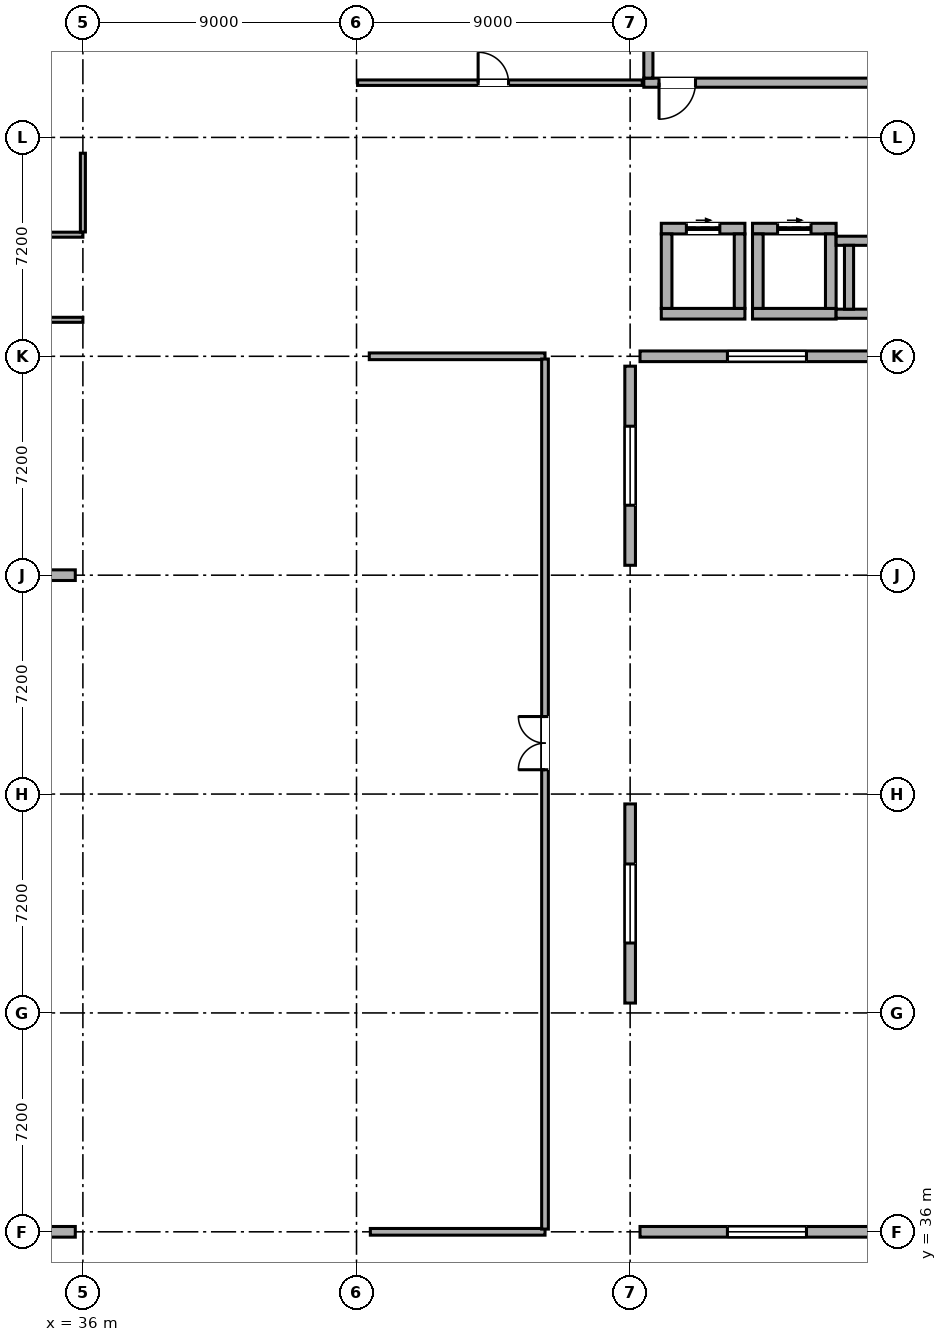
"""IFC4 building model, lengths in metres.
Left out: names, types, materials, properties, quantities, classifications, styles, units other than length and angle.
Written with IfcOpenShell. Run it as: python <this file> out.ifc"""

import sys

from ifc_helpers import new_model, si_unit, direction, frame, frame_2d, origin, origin_2d, place, context, subcontext, project, spatial, rectangle, hollow_rectangle, extrude, element, fill, save


model = new_model("IFC4")
c1 = context("Model", 3, precision=1e-05, world=origin(), true_north=direction((0.0, 1.0)))
c2 = subcontext(c1, "Body", "Model", "MODEL_VIEW")
j1 = project(units=[si_unit("LENGTHUNIT", "METRE"), si_unit("PLANEANGLEUNIT", "RADIAN")], contexts=[c1])
p1 = place(None, origin())
s1 = spatial("IfcSite", under=j1, at=p1, CompositionType="ELEMENT")
p2 = place(p1, origin())
s2 = spatial("IfcBuilding", under=s1, at=p2, CompositionType="ELEMENT")
p3 = place(p2, origin())
s3 = spatial("IfcBuildingStorey", under=s2, at=p3, CompositionType="ELEMENT", Elevation=0.0)
for number, where, z_axis, x_axis in (
    (1, (36.0, 36.0, 0.0), (0.0, 0.0, 1.0), (1.0, 0.0, 0.0)),
    (2, (36.0, 57.6, 0.0), (0.0, 0.0, 1.0), (1.0, 0.0, 0.0)),
    (3, (36.0, 64.8, 0.0), (0.0, 0.0, 1.0), (1.0, 0.0, 0.0)),
    (4, (36.0, 72.0, 0.0), (0.0, 0.0, 1.0), (1.0, 0.0, 0.0)),
    (5, (45.0, 36.0, 0.0), (0.0, 0.0, 1.0), (1.0, 0.0, 0.0)),
    (6, (45.0, 43.2, 0.0), (0.0, 0.0, 1.0), (1.0, 0.0, 0.0)),
    (7, (45.0, 50.4, 0.0), (0.0, 0.0, 1.0), (1.0, 0.0, 0.0)),
    (8, (45.0, 57.6, 0.0), (0.0, 0.0, 1.0), (1.0, 0.0, 0.0)),
    (9, (45.0, 64.8, 0.0), (0.0, 0.0, 1.0), (1.0, 0.0, 0.0)),
    (10, (45.0, 72.0, 0.0), (0.0, 0.0, 1.0), (1.0, 0.0, 0.0)),
):
    element("IfcColumn", number, at=place(p3, frame(where, z_axis=z_axis, x_axis=x_axis)), inside=s3, PredefinedType="COLUMN", context=c2, shape_type="SweptSolid", body=[
        extrude(hollow_rectangle(XDim=0.5, YDim=0.5, WallThickness=0.022, at=origin_2d()), origin(), (0.0, 0.0, 1.0), 4.8),
    ])
for number, where, z_axis, x_axis in (
    (11, (54.0, 36.0, 0.0), (0.0, 0.0, 1.0), (1.0, 0.0, 0.0)),
    (12, (54.0, 43.2, 0.0), (0.0, 0.0, 1.0), (1.0, 0.0, 0.0)),
    (13, (54.0, 50.4, 0.0), (0.0, 0.0, 1.0), (1.0, 0.0, 0.0)),
    (14, (54.0, 57.6, 0.0), (0.0, 0.0, 1.0), (1.0, 0.0, 0.0)),
    (15, (54.0, 64.8, 0.0), (0.0, 0.0, 1.0), (1.0, 0.0, 0.0)),
    (16, (54.0, 72.0, 0.0), (0.0, 0.0, 1.0), (1.0, 0.0, 0.0)),
):
    element("IfcColumn", number, at=place(p3, frame(where, z_axis=z_axis, x_axis=x_axis)), inside=s3, PredefinedType="COLUMN", context=c2, shape_type="SweptSolid", body=[
        extrude(hollow_rectangle(XDim=0.65, YDim=0.65, WallThickness=0.025, at=origin_2d()), origin(), (0.0, 0.0, 1.0), 4.8),
    ])
p4 = place(p3, frame((35.75, 36.0, 0.0), z_axis=(0.0, 0.0, 1.0), x_axis=(-1.0, 0.0, 0.0)))
e17 = element("IfcWall", 17, at=p4, inside=s3, PredefinedType="STANDARD", context=c2, shape_type="SweptSolid", body=[
    extrude(rectangle(XDim=8.425, YDim=0.35, at=frame_2d((4.212, 0.0))), origin(), (0.0, 0.0, 1.0), 4.055),
])
p5 = place(p4, frame((2.913, 0.0, 0.85)))
e18 = element("IfcOpeningElement", 18, at=p5, cuts=e17, PredefinedType="OPENING", context=c2, shape_type="SweptSolid", body=[
    extrude(rectangle(XDim=2.6, YDim=1.6, at=frame_2d((1.3, 0.8))), frame((0.0, 0.187, 0.0), z_axis=(0.0, -1.0, 0.0), x_axis=(1.0, 0.0, 0.0)), (0.0, 0.0, 1.0), 0.374),
])
p6 = place(p3, frame((62.675, 36.0, 0.0), z_axis=(0.0, 0.0, 1.0), x_axis=(-1.0, 0.0, 0.0)))
e19 = element("IfcWall", 19, at=p6, inside=s3, PredefinedType="STANDARD", context=c2, shape_type="SweptSolid", body=[
    extrude(rectangle(XDim=8.35, YDim=0.35, at=frame_2d((4.175, 0.0))), origin(), (0.0, 0.0, 1.0), 4.055),
])
p7 = place(p6, frame((2.875, 0.0, 0.85)))
e20 = element("IfcOpeningElement", 20, at=p7, cuts=e19, PredefinedType="OPENING", context=c2, shape_type="SweptSolid", body=[
    extrude(rectangle(XDim=2.6, YDim=1.6, at=frame_2d((1.3, 0.8))), frame((0.0, 0.187, 0.0), z_axis=(0.0, -1.0, 0.0), x_axis=(1.0, 0.0, 0.0)), (0.0, 0.0, 1.0), 0.374),
])
p8 = place(p3, frame((27.325, 57.6, 0.0), z_axis=(0.0, 0.0, 1.0), x_axis=(1.0, 0.0, 0.0)))
e21 = element("IfcWall", 21, at=p8, inside=s3, PredefinedType="STANDARD", context=c2, shape_type="SweptSolid", body=[
    extrude(rectangle(XDim=8.425, YDim=0.35, at=frame_2d((4.212, 0.0))), origin(), (0.0, 0.0, 1.0), 4.055),
])
p9 = place(p8, frame((3.012, 0.0, 0.0)))
e22 = element("IfcOpeningElement", 22, at=p9, cuts=e21, PredefinedType="OPENING", context=c2, shape_type="SweptSolid", body=[
    extrude(rectangle(XDim=2.4, YDim=2.55, at=frame_2d((1.2, 1.275))), frame((0.0, 0.187, 0.0), z_axis=(0.0, -1.0, 0.0), x_axis=(1.0, 0.0, 0.0)), (0.0, 0.0, 1.0), 0.374),
])
p10 = place(p3, frame((54.325, 64.8, 0.0), z_axis=(0.0, 0.0, 1.0), x_axis=(1.0, 0.0, 0.0)))
e23 = element("IfcWall", 23, at=p10, inside=s3, PredefinedType="STANDARD", context=c2, shape_type="SweptSolid", body=[
    extrude(rectangle(XDim=8.35, YDim=0.35, at=frame_2d((4.175, 0.0))), origin(), (0.0, 0.0, 1.0), 4.055),
])
p11 = place(p10, frame((2.875, 0.0, 0.85)))
e24 = element("IfcOpeningElement", 24, at=p11, cuts=e23, PredefinedType="OPENING", context=c2, shape_type="SweptSolid", body=[
    extrude(rectangle(XDim=2.6, YDim=1.6, at=frame_2d((1.3, 0.8))), frame((0.0, 0.187, 0.0), z_axis=(0.0, -1.0, 0.0), x_axis=(1.0, 0.0, 0.0)), (0.0, 0.0, 1.0), 0.374),
])
p12 = place(p3, frame((54.0, 50.075, 0.0), z_axis=(0.0, 0.0, 1.0), x_axis=(0.0, -1.0, 0.0)))
e25 = element("IfcWall", 25, at=p12, inside=s3, PredefinedType="STANDARD", context=c2, shape_type="SweptSolid", body=[
    extrude(rectangle(XDim=6.55, YDim=0.35, at=frame_2d((3.275, 0.0))), origin(), (0.0, 0.0, 1.0), 4.055),
])
p13 = place(p12, frame((1.975, 0.0, 0.85)))
e26 = element("IfcOpeningElement", 26, at=p13, cuts=e25, PredefinedType="OPENING", context=c2, shape_type="SweptSolid", body=[
    extrude(rectangle(XDim=2.6, YDim=1.6, at=frame_2d((1.3, 0.8))), frame((0.0, 0.187, 0.0), z_axis=(0.0, -1.0, 0.0), x_axis=(1.0, 0.0, 0.0)), (0.0, 0.0, 1.0), 0.374),
])
p14 = place(p3, frame((54.0, 64.475, 0.0), z_axis=(0.0, 0.0, 1.0), x_axis=(0.0, -1.0, 0.0)))
e27 = element("IfcWall", 27, at=p14, inside=s3, PredefinedType="STANDARD", context=c2, shape_type="SweptSolid", body=[
    extrude(rectangle(XDim=6.55, YDim=0.35, at=frame_2d((3.275, 0.0))), origin(), (0.0, 0.0, 1.0), 4.055),
])
p15 = place(p14, frame((1.975, 0.0, 0.85)))
e28 = element("IfcOpeningElement", 28, at=p15, cuts=e27, PredefinedType="OPENING", context=c2, shape_type="SweptSolid", body=[
    extrude(rectangle(XDim=2.6, YDim=1.6, at=frame_2d((1.3, 0.8))), frame((0.0, 0.187, 0.0), z_axis=(0.0, -1.0, 0.0), x_axis=(1.0, 0.0, 0.0)), (0.0, 0.0, 1.0), 0.374),
])
p16 = place(p3, frame((54.45, 73.8, 0.0), z_axis=(0.0, 0.0, 1.0), x_axis=(1.0, 0.0, 0.0)))
e29 = element("IfcWall", 29, at=p16, inside=s3, PredefinedType="SHEAR", context=c2, shape_type="SweptSolid", body=[
    extrude(rectangle(XDim=8.1, YDim=0.3, at=frame_2d((4.05, 0.0))), origin(), (0.0, 0.0, 1.0), 4.555),
])
p17 = place(p16, frame((0.5, 0.0, 0.0)))
e30 = element("IfcOpeningElement", 30, at=p17, cuts=e29, PredefinedType="OPENING", context=c2, shape_type="SweptSolid", body=[
    extrude(rectangle(XDim=1.2, YDim=2.1, at=frame_2d((0.6, 1.05))), frame((0.0, 0.162, 0.0), z_axis=(0.0, -1.0, 0.0), x_axis=(1.0, 0.0, 0.0)), (0.0, 0.0, 1.0), 0.324),
])
p18 = place(p3, frame((54.6, 73.95, 0.0), z_axis=(0.0, 0.0, 1.0), x_axis=(0.0, 1.0, 0.0)))
e31 = element("IfcWall", 31, at=p18, inside=s3, PredefinedType="SHEAR", context=c2, shape_type="SweptSolid", body=[
    extrude(rectangle(XDim=3.8, YDim=0.3, at=frame_2d((1.9, 0.0))), origin(), (0.0, 0.0, 1.0), 4.555),
])
p19 = place(p3, frame((55.025, 66.2, 0.0), z_axis=(0.0, 0.0, 1.0), x_axis=(1.0, 0.0, 0.0)))
e32 = element("IfcWall", 32, at=p19, inside=s3, PredefinedType="SHEAR", context=c2, shape_type="SweptSolid", body=[
    extrude(rectangle(XDim=2.75, YDim=0.35, at=frame_2d((1.375, 0.0))), origin(), (0.0, 0.0, 1.0), 4.555),
])
p20 = place(p3, frame((55.025, 69.0, 0.0), z_axis=(0.0, 0.0, 1.0), x_axis=(1.0, 0.0, 0.0)))
e33 = element("IfcWall", 33, at=p20, inside=s3, PredefinedType="SHEAR", context=c2, shape_type="SweptSolid", body=[
    extrude(rectangle(XDim=2.75, YDim=0.35, at=frame_2d((1.375, 0.0))), origin(), (0.0, 0.0, 1.0), 4.555),
])
p21 = place(p20, frame((0.825, 0.0, 0.0)))
e34 = element("IfcOpeningElement", 34, at=p21, cuts=e33, PredefinedType="OPENING", context=c2, shape_type="SweptSolid", body=[
    extrude(rectangle(XDim=1.1, YDim=2.1, at=frame_2d((0.55, 1.05))), frame((0.0, 0.187, 0.0), z_axis=(0.0, -1.0, 0.0), x_axis=(1.0, 0.0, 0.0)), (0.0, 0.0, 1.0), 0.374),
])
for number, where, z_axis, x_axis in (
    (35, (55.2, 66.375, 0.0), (0.0, 0.0, 1.0), (0.0, 1.0, 0.0)),
    (36, (57.6, 66.375, 0.0), (0.0, 0.0, 1.0), (0.0, 1.0, 0.0)),
):
    element("IfcWall", number, at=place(p3, frame(where, z_axis=z_axis, x_axis=x_axis)), inside=s3, PredefinedType="SHEAR", context=c2, shape_type="SweptSolid", body=[
        extrude(rectangle(XDim=2.45, YDim=0.35, at=frame_2d((1.225, 0.0))), origin(), (0.0, 0.0, 1.0), 4.555),
    ])
p22 = place(p3, frame((58.025, 66.2, 0.0), z_axis=(0.0, 0.0, 1.0), x_axis=(1.0, 0.0, 0.0)))
e37 = element("IfcWall", 37, at=p22, inside=s3, PredefinedType="SHEAR", context=c2, shape_type="SweptSolid", body=[
    extrude(rectangle(XDim=2.75, YDim=0.35, at=frame_2d((1.375, 0.0))), origin(), (0.0, 0.0, 1.0), 4.555),
])
p23 = place(p3, frame((58.025, 69.0, 0.0), z_axis=(0.0, 0.0, 1.0), x_axis=(1.0, 0.0, 0.0)))
e38 = element("IfcWall", 38, at=p23, inside=s3, PredefinedType="SHEAR", context=c2, shape_type="SweptSolid", body=[
    extrude(rectangle(XDim=2.75, YDim=0.35, at=frame_2d((1.375, 0.0))), origin(), (0.0, 0.0, 1.0), 4.555),
])
p24 = place(p23, frame((0.825, 0.0, 0.0)))
e39 = element("IfcOpeningElement", 39, at=p24, cuts=e38, PredefinedType="OPENING", context=c2, shape_type="SweptSolid", body=[
    extrude(rectangle(XDim=1.1, YDim=2.1, at=frame_2d((0.55, 1.05))), frame((0.0, 0.187, 0.0), z_axis=(0.0, -1.0, 0.0), x_axis=(1.0, 0.0, 0.0)), (0.0, 0.0, 1.0), 0.374),
])
for number, where, z_axis, x_axis in (
    (40, (58.2, 66.375, 0.0), (0.0, 0.0, 1.0), (0.0, 1.0, 0.0)),
    (41, (60.6, 66.375, 0.0), (0.0, 0.0, 1.0), (0.0, 1.0, 0.0)),
):
    element("IfcWall", number, at=place(p3, frame(where, z_axis=z_axis, x_axis=x_axis)), inside=s3, PredefinedType="SHEAR", context=c2, shape_type="SweptSolid", body=[
        extrude(rectangle(XDim=2.45, YDim=0.35, at=frame_2d((1.225, 0.0))), origin(), (0.0, 0.0, 1.0), 4.555),
    ])
for number, where, z_axis, x_axis in (
    (42, (60.775, 66.2, 0.0), (0.0, 0.0, 1.0), (1.0, 0.0, 0.0)),
    (43, (60.775, 68.6, 0.0), (0.0, 0.0, 1.0), (1.0, 0.0, 0.0)),
):
    element("IfcWall", number, at=place(p3, frame(where, z_axis=z_axis, x_axis=x_axis)), inside=s3, PredefinedType="SHEAR", context=c2, shape_type="SweptSolid", body=[
        extrude(rectangle(XDim=2.175, YDim=0.3, at=frame_2d((1.087, 0.0))), origin(), (0.0, 0.0, 1.0), 4.555),
    ])
p25 = place(p3, frame((61.2, 66.35, 0.0), z_axis=(0.0, 0.0, 1.0), x_axis=(0.0, 1.0, 0.0)))
e44 = element("IfcWall", 44, at=p25, inside=s3, PredefinedType="SHEAR", context=c2, shape_type="SweptSolid", body=[
    extrude(rectangle(XDim=2.1, YDim=0.3, at=frame_2d((1.05, 0.0))), origin(), (0.0, 0.0, 1.0), 4.555),
])
p26 = place(p3, frame((19.2, 66.0, 0.0), z_axis=(0.0, 0.0, 1.0), x_axis=(1.0, 0.0, 0.0)))
e45 = element("IfcWall", 45, at=p26, inside=s3, PredefinedType="PARTITIONING", context=c2, shape_type="SweptSolid", body=[
    extrude(rectangle(XDim=16.8, YDim=0.165, at=frame_2d((8.4, 0.0))), origin(), (0.0, 0.0, 1.0), 4.555),
])
p27 = place(p26, frame((2.575, 0.0, 0.0)))
e46 = element("IfcOpeningElement", 46, at=p27, cuts=e45, PredefinedType="OPENING", context=c2, shape_type="SweptSolid", body=[
    extrude(rectangle(XDim=1.45, YDim=2.1, at=frame_2d((0.725, 1.05))), frame((0.0, 0.094, 0.0), z_axis=(0.0, -1.0, 0.0), x_axis=(1.0, 0.0, 0.0)), (0.0, 0.0, 1.0), 0.189),
])
p28 = place(p3, frame((19.2, 68.8, 0.0), z_axis=(0.0, 0.0, 1.0), x_axis=(1.0, 0.0, 0.0)))
e47 = element("IfcWall", 47, at=p28, inside=s3, PredefinedType="PARTITIONING", context=c2, shape_type="SweptSolid", body=[
    extrude(rectangle(XDim=16.8, YDim=0.165, at=frame_2d((8.4, 0.0))), origin(), (0.0, 0.0, 1.0), 4.555),
])
p29 = place(p3, frame((36.0, 68.89, 0.0), z_axis=(0.0, 0.0, 1.0), x_axis=(0.0, 1.0, 0.0)))
e48 = element("IfcWall", 48, at=p29, inside=s3, PredefinedType="PARTITIONING", context=c2, shape_type="SweptSolid", body=[
    extrude(rectangle(XDim=2.59, YDim=0.165, at=frame_2d((1.295, 0.0))), origin(), (0.0, 0.0, 1.0), 3.835),
])
p30 = place(p3, frame((45.455, 36.0, 0.0), z_axis=(0.0, 0.0, 1.0), x_axis=(1.0, 0.0, 0.0)))
e49 = element("IfcWall", 49, at=p30, inside=s3, PredefinedType="PARTITIONING", context=c2, shape_type="SweptSolid", body=[
    extrude(rectangle(XDim=5.745, YDim=0.22, at=frame_2d((2.873, 0.0))), origin(), (0.0, 0.0, 1.0), 3.835),
])
p31 = place(p3, frame((45.42, 64.8, 0.0), z_axis=(0.0, 0.0, 1.0), x_axis=(1.0, 0.0, 0.0)))
e50 = element("IfcWall", 50, at=p31, inside=s3, PredefinedType="PARTITIONING", context=c2, shape_type="SweptSolid", body=[
    extrude(rectangle(XDim=5.78, YDim=0.22, at=frame_2d((2.89, 0.0))), origin(), (0.0, 0.0, 1.0), 3.835),
])
p32 = place(p3, frame((51.2, 36.09, 0.0), z_axis=(0.0, 0.0, 1.0), x_axis=(0.0, 1.0, 0.0)))
e51 = element("IfcWall", 51, at=p32, inside=s3, PredefinedType="PARTITIONING", context=c2, shape_type="SweptSolid", body=[
    extrude(rectangle(XDim=28.62, YDim=0.22, at=frame_2d((14.31, 0.0))), origin(), (0.0, 0.0, 1.0), 4.555),
])
p33 = place(p32, frame((15.11, 0.0, 0.0)))
e52 = element("IfcOpeningElement", 52, at=p33, cuts=e51, PredefinedType="OPENING", context=c2, shape_type="SweptSolid", body=[
    extrude(rectangle(XDim=1.75, YDim=2.12, at=frame_2d((0.875, 1.06))), frame((0.0, 0.122, 0.0), z_axis=(0.0, -1.0, 0.0), x_axis=(1.0, 0.0, 0.0)), (0.0, 0.0, 1.0), 0.244),
])
p34 = place(p3, frame((45.035, 73.8, 0.0), z_axis=(0.0, 0.0, 1.0), x_axis=(1.0, 0.0, 0.0)))
e53 = element("IfcWall", 53, at=p34, inside=s3, PredefinedType="PARTITIONING", context=c2, shape_type="SweptSolid", body=[
    extrude(rectangle(XDim=9.365, YDim=0.18, at=frame_2d((4.683, 0.0))), origin(), (0.0, 0.0, 1.0), 4.555),
])
p35 = place(p34, frame((3.965, 0.0, 0.0)))
e54 = element("IfcOpeningElement", 54, at=p35, cuts=e53, PredefinedType="OPENING", context=c2, shape_type="SweptSolid", body=[
    extrude(rectangle(XDim=1.0, YDim=2.08, at=frame_2d((0.5, 1.04))), frame((0.0, 0.102, 0.0), z_axis=(0.0, -1.0, 0.0), x_axis=(1.0, 0.0, 0.0)), (0.0, 0.0, 1.0), 0.204),
])
p36 = place(p7, origin())
e55 = element("IfcWindow", 55, at=p36, inside=s3, PartitioningType="DOUBLE_PANEL_VERTICAL", PredefinedType="WINDOW", context=c2, shape_type="SweptSolid", body=[
    extrude(rectangle(XDim=2.6, YDim=1.6, at=frame_2d((1.3, 0.8))), frame((0.0, 0.03, 0.0), z_axis=(0.0, -1.0, 0.0), x_axis=(1.0, 0.0, 0.0)), (0.0, 0.0, 1.0), 0.06),
])
fill(e20, e55)
p37 = place(p11, origin())
e56 = element("IfcWindow", 56, at=p37, inside=s3, PartitioningType="DOUBLE_PANEL_VERTICAL", PredefinedType="WINDOW", context=c2, shape_type="SweptSolid", body=[
    extrude(rectangle(XDim=2.6, YDim=1.6, at=frame_2d((1.3, 0.8))), frame((0.0, 0.03, 0.0), z_axis=(0.0, -1.0, 0.0), x_axis=(1.0, 0.0, 0.0)), (0.0, 0.0, 1.0), 0.06),
])
fill(e24, e56)
p38 = place(p13, origin())
e57 = element("IfcWindow", 57, at=p38, inside=s3, PartitioningType="DOUBLE_PANEL_VERTICAL", PredefinedType="WINDOW", context=c2, shape_type="SweptSolid", body=[
    extrude(rectangle(XDim=2.6, YDim=1.6, at=frame_2d((1.3, 0.8))), frame((0.0, 0.03, 0.0), z_axis=(0.0, -1.0, 0.0), x_axis=(1.0, 0.0, 0.0)), (0.0, 0.0, 1.0), 0.06),
])
fill(e26, e57)
p39 = place(p15, origin())
e58 = element("IfcWindow", 58, at=p39, inside=s3, PartitioningType="DOUBLE_PANEL_VERTICAL", PredefinedType="WINDOW", context=c2, shape_type="SweptSolid", body=[
    extrude(rectangle(XDim=2.6, YDim=1.6, at=frame_2d((1.3, 0.8))), frame((0.0, 0.03, 0.0), z_axis=(0.0, -1.0, 0.0), x_axis=(1.0, 0.0, 0.0)), (0.0, 0.0, 1.0), 0.06),
])
fill(e28, e58)
p40 = place(p17, frame((1.2, 0.0, 0.0), z_axis=(0.0, 0.0, 1.0), x_axis=(-1.0, 0.0, 0.0)))
e59 = element("IfcDoor", 59, at=p40, inside=s3, OperationType="SINGLE_SWING_RIGHT", PredefinedType="DOOR", context=c2, shape_type="SweptSolid", body=[
    extrude(rectangle(XDim=1.2, YDim=2.1, at=frame_2d((0.6, 1.05))), frame((0.0, 0.025, 0.0), z_axis=(0.0, -1.0, 0.0), x_axis=(1.0, 0.0, 0.0)), (0.0, 0.0, 1.0), 0.05),
])
fill(e30, e59)
p41 = place(p21, origin())
e60 = element("IfcDoor", 60, at=p41, inside=s3, OperationType="SLIDING_TO_RIGHT", PredefinedType="DOOR", context=c2, shape_type="SweptSolid", body=[
    extrude(rectangle(XDim=1.1, YDim=2.1, at=frame_2d((0.55, 1.05))), frame((0.0, 0.025, 0.0), z_axis=(0.0, -1.0, 0.0), x_axis=(1.0, 0.0, 0.0)), (0.0, 0.0, 1.0), 0.05),
])
fill(e34, e60)
p42 = place(p24, origin())
e61 = element("IfcDoor", 61, at=p42, inside=s3, OperationType="SLIDING_TO_RIGHT", PredefinedType="DOOR", context=c2, shape_type="SweptSolid", body=[
    extrude(rectangle(XDim=1.1, YDim=2.1, at=frame_2d((0.55, 1.05))), frame((0.0, 0.025, 0.0), z_axis=(0.0, -1.0, 0.0), x_axis=(1.0, 0.0, 0.0)), (0.0, 0.0, 1.0), 0.05),
])
fill(e39, e61)
p43 = place(p33, origin())
e62 = element("IfcDoor", 62, at=p43, inside=s3, OperationType="DOUBLE_DOOR_SINGLE_SWING", PredefinedType="DOOR", context=c2, shape_type="SweptSolid", body=[
    extrude(rectangle(XDim=1.75, YDim=2.12, at=frame_2d((0.875, 1.06))), frame((0.0, 0.025, 0.0), z_axis=(0.0, -1.0, 0.0), x_axis=(1.0, 0.0, 0.0)), (0.0, 0.0, 1.0), 0.05),
])
fill(e52, e62)
p44 = place(p35, origin())
e63 = element("IfcDoor", 63, at=p44, inside=s3, OperationType="SINGLE_SWING_LEFT", PredefinedType="DOOR", context=c2, shape_type="SweptSolid", body=[
    extrude(rectangle(XDim=1.0, YDim=2.08, at=frame_2d((0.5, 1.04))), frame((0.0, 0.025, 0.0), z_axis=(0.0, -1.0, 0.0), x_axis=(1.0, 0.0, 0.0)), (0.0, 0.0, 1.0), 0.05),
])
fill(e54, e63)
save(model, sys.argv[1])
